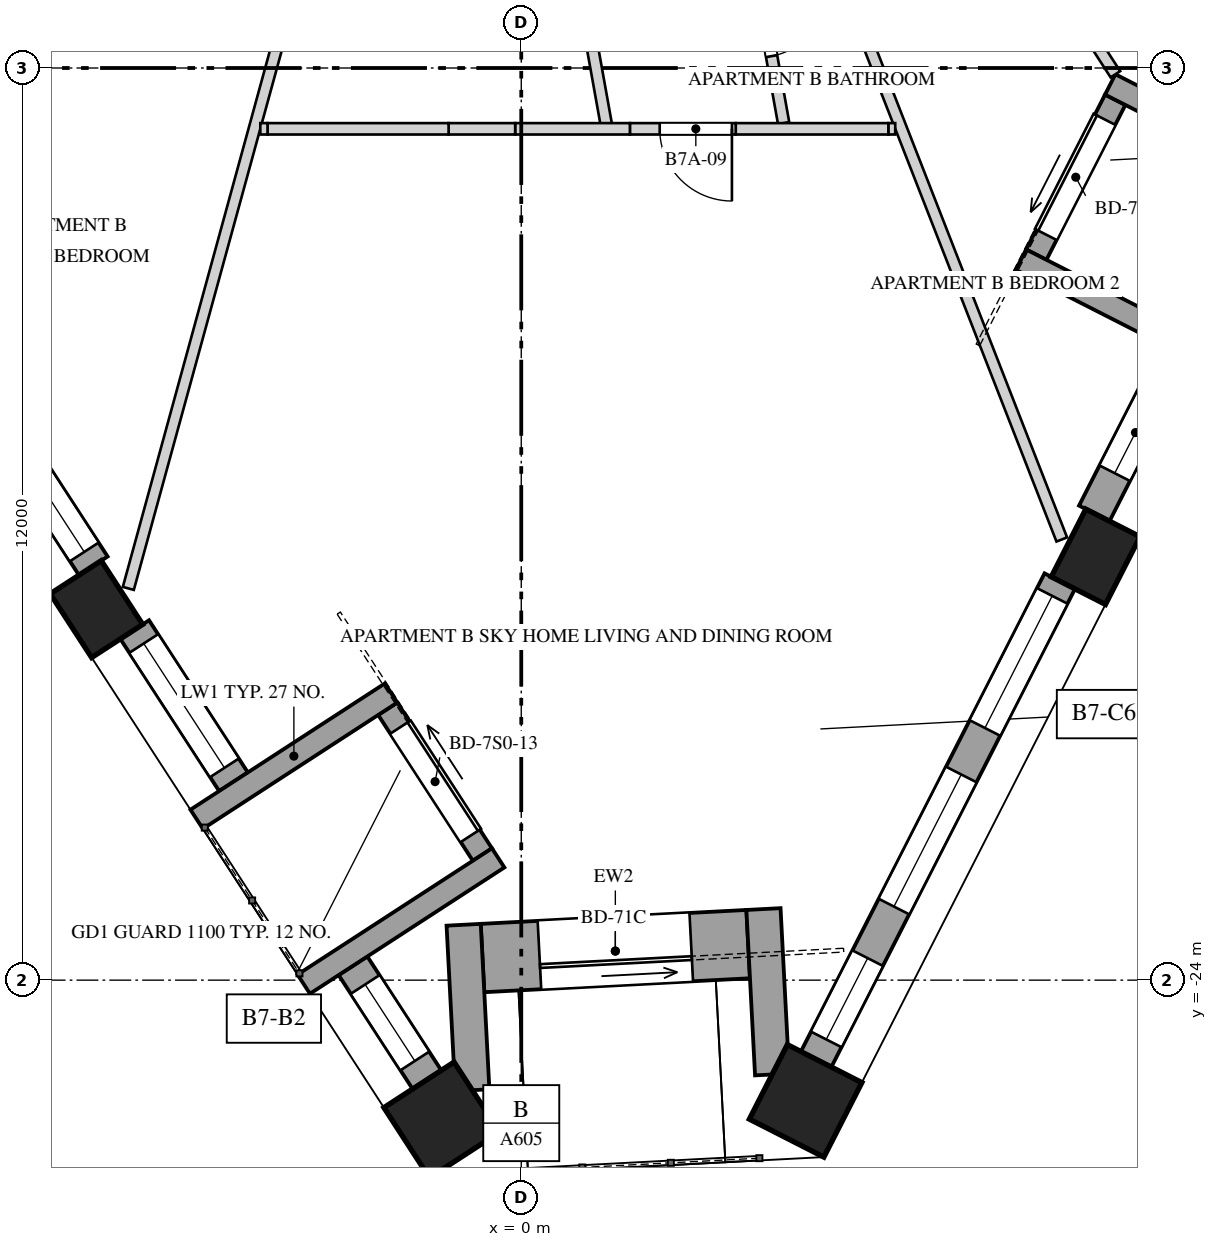
"""IFC4 building model, lengths in metres.
Left out: names, types, materials, properties, quantities, classifications, styles, units other than length and angle.
Written with IfcOpenShell. Run it as: python <this file> out.ifc"""

import sys

from ifc_helpers import new_model, si_unit, direction, frame, frame_2d, origin, origin_2d, place, context, subcontext, project, spatial, polyline, rectangle, outline, extrude, element, fill, save


model = new_model("IFC4")
c1 = context("Model", 3, precision=1e-05, world=origin(), true_north=direction((0.0, 1.0)))
c2 = subcontext(c1, "Body", "Model", "MODEL_VIEW")
j1 = project(units=[si_unit("LENGTHUNIT", "METRE"), si_unit("PLANEANGLEUNIT", "RADIAN")], contexts=[c1])
p1 = place(None, origin())
s1 = spatial("IfcSite", under=j1, at=p1, CompositionType="ELEMENT")
p2 = place(p1, origin())
s2 = spatial("IfcBuilding", under=s1, at=p2, CompositionType="ELEMENT")
p3 = place(p2, frame((0.0, 0.0, 274.4)))
s3 = spatial("IfcBuildingStorey", under=s2, at=p3, CompositionType="ELEMENT", Elevation=274.4)
p4 = place(p3, frame((-5.589, -19.119, -0.35), z_axis=(0.0, 0.0, 1.0), x_axis=(0.544639035015, -0.838670567945, 0.0)))
e1 = element("IfcColumn", 1, at=p4, inside=s3, PredefinedType="COLUMN", context=c2, shape_type="SweptSolid", body=[
    extrude(rectangle(XDim=1.0, YDim=0.8, at=origin_2d()), origin(), (0.0, 0.0, 1.0), 4.35),
])
for number, where, z_axis, x_axis in (
    (2, (-1.046, -25.839, -0.35), (0.0, 0.0, 1.0), (0.545, -0.839, 0.0)),
    (3, (3.741, -25.588, -0.35), (0.0, 0.0, 1.0), (0.454, 0.891, 0.0)),
):
    element("IfcColumn", number, at=place(p3, frame(where, z_axis=z_axis, x_axis=x_axis)), inside=s3, PredefinedType="COLUMN", context=c2, shape_type="SweptSolid", body=[
        extrude(rectangle(XDim=1.1, YDim=1.1, at=origin_2d()), origin(), (0.0, 0.0, 1.0), 4.35),
    ])
p5 = place(p3, frame((7.557, -18.43, -0.35), z_axis=(0.0, 0.0, 1.0), x_axis=(0.45399049974, 0.891006524188, 0.0)))
e4 = element("IfcColumn", 4, at=p5, inside=s3, PredefinedType="COLUMN", context=c2, shape_type="SweptSolid", body=[
    extrude(rectangle(XDim=1.0, YDim=0.8, at=origin_2d()), origin(), (0.0, 0.0, 1.0), 4.35),
])
p6 = place(p3, frame((-9.803, -12.125, 0.0), z_axis=(0.0, 0.0, 1.0), x_axis=(0.544649987904, -0.838663454954, 0.0)))
e5 = element("IfcWall", 5, at=p6, inside=s3, PredefinedType="SOLIDWALL", context=c2, shape_type="SweptSolid", body=[
    extrude(rectangle(XDim=7.66, YDim=0.45, at=frame_2d((3.83, 0.0))), origin(), (0.0, 0.0, 1.0), 3.3),
])
p7 = place(p6, frame((0.218, 0.0, 0.4)))
e6 = element("IfcOpeningElement", 6, at=p7, cuts=e5, PredefinedType="OPENING", context=c2, shape_type="SweptSolid", body=[
    extrude(rectangle(XDim=1.95, YDim=2.75, at=frame_2d((0.975, 1.375))), frame((0.0, 0.235, 0.0), z_axis=(0.0, -1.0, 0.0), x_axis=(1.0, 0.0, 0.0)), (0.0, 0.0, 1.0), 0.47),
])
p8 = place(p6, frame((2.855, 0.0, 0.4)))
e7 = element("IfcOpeningElement", 7, at=p8, cuts=e5, PredefinedType="OPENING", context=c2, shape_type="SweptSolid", body=[
    extrude(rectangle(XDim=1.95, YDim=2.75, at=frame_2d((0.975, 1.375))), frame((0.0, 0.235, 0.0), z_axis=(0.0, -1.0, 0.0), x_axis=(1.0, 0.0, 0.0)), (0.0, 0.0, 1.0), 0.47),
])
p9 = place(p6, frame((5.492, 0.0, 0.4)))
e8 = element("IfcOpeningElement", 8, at=p9, cuts=e5, PredefinedType="OPENING", context=c2, shape_type="SweptSolid", body=[
    extrude(rectangle(XDim=1.95, YDim=2.1, at=frame_2d((0.975, 1.05))), frame((0.0, 0.235, 0.0), z_axis=(0.0, -1.0, 0.0), x_axis=(1.0, 0.0, 0.0)), (0.0, 0.0, 1.0), 0.47),
])
p10 = place(p3, frame((-5.086, -19.388, 0.0), z_axis=(0.0, 0.0, 1.0), x_axis=(0.544675520966, -0.838646872563, 0.0)))
e9 = element("IfcWall", 9, at=p10, inside=s3, PredefinedType="SOLIDWALL", context=c2, shape_type="SweptSolid", body=[
    extrude(rectangle(XDim=2.387, YDim=0.45, at=frame_2d((1.193, 0.0))), origin(), (0.0, 0.0, 1.0), 3.3),
])
p11 = place(p10, frame((0.218, 0.0, 0.4)))
e10 = element("IfcOpeningElement", 10, at=p11, cuts=e9, PredefinedType="OPENING", context=c2, shape_type="SweptSolid", body=[
    extrude(rectangle(XDim=1.95, YDim=2.75, at=frame_2d((0.975, 1.375))), frame((0.0, 0.235, 0.0), z_axis=(0.0, -1.0, 0.0), x_axis=(1.0, 0.0, 0.0)), (0.0, 0.0, 1.0), 0.47),
])
p12 = place(p3, frame((-2.214, -23.811, 0.0), z_axis=(0.0, 0.0, 1.0), x_axis=(0.544632902776, -0.838674550236, 0.0)))
e11 = element("IfcWall", 11, at=p12, inside=s3, PredefinedType="SOLIDWALL", context=c2, shape_type="SweptSolid", body=[
    extrude(rectangle(XDim=1.787, YDim=0.45, at=frame_2d((0.894, 0.0))), origin(), (0.0, 0.0, 1.0), 3.3),
])
p13 = place(p12, frame((0.293, 0.0, 0.4)))
e12 = element("IfcOpeningElement", 12, at=p13, cuts=e11, PredefinedType="OPENING", context=c2, shape_type="SweptSolid", body=[
    extrude(rectangle(XDim=1.2, YDim=2.1, at=frame_2d((0.6, 1.05))), frame((0.0, 0.235, 0.0), z_axis=(0.0, -1.0, 0.0), x_axis=(1.0, 0.0, 0.0)), (0.0, 0.0, 1.0), 0.47),
])
p14 = place(p3, frame((3.879, -25.041, 0.0), z_axis=(0.0, 0.0, 1.0), x_axis=(0.453992084912, 0.891005716501, 0.0)))
e13 = element("IfcWall", 13, at=p14, inside=s3, PredefinedType="SOLIDWALL", context=c2, shape_type="SweptSolid", body=[
    extrude(rectangle(XDim=7.06, YDim=0.45, at=frame_2d((3.53, 0.0))), origin(), (0.0, 0.0, 1.0), 3.3),
])
p15 = place(p14, frame((0.293, 0.0, 0.4)))
e14 = element("IfcOpeningElement", 14, at=p15, cuts=e13, PredefinedType="OPENING", context=c2, shape_type="SweptSolid", body=[
    extrude(rectangle(XDim=1.2, YDim=2.1, at=frame_2d((0.6, 1.05))), frame((0.0, 0.235, 0.0), z_axis=(0.0, -1.0, 0.0), x_axis=(1.0, 0.0, 0.0)), (0.0, 0.0, 1.0), 0.47),
])
p16 = place(p14, frame((2.255, 0.0, 0.4)))
e15 = element("IfcOpeningElement", 15, at=p16, cuts=e13, PredefinedType="OPENING", context=c2, shape_type="SweptSolid", body=[
    extrude(rectangle(XDim=1.95, YDim=2.75, at=frame_2d((0.975, 1.375))), frame((0.0, 0.235, 0.0), z_axis=(0.0, -1.0, 0.0), x_axis=(1.0, 0.0, 0.0)), (0.0, 0.0, 1.0), 0.47),
])
p17 = place(p14, frame((4.892, 0.0, 0.4)))
e16 = element("IfcOpeningElement", 16, at=p17, cuts=e13, PredefinedType="OPENING", context=c2, shape_type="SweptSolid", body=[
    extrude(rectangle(XDim=1.95, YDim=2.75, at=frame_2d((0.975, 1.375))), frame((0.0, 0.235, 0.0), z_axis=(0.0, -1.0, 0.0), x_axis=(1.0, 0.0, 0.0)), (0.0, 0.0, 1.0), 0.47),
])
p18 = place(p3, frame((7.539, -17.859, 0.0), z_axis=(0.0, 0.0, 1.0), x_axis=(0.454074413722, 0.890963762901, 0.0)))
e17 = element("IfcWall", 17, at=p18, inside=s3, PredefinedType="SOLIDWALL", context=c2, shape_type="SweptSolid", body=[
    extrude(rectangle(XDim=2.387, YDim=0.45, at=frame_2d((1.193, 0.0))), origin(), (0.0, 0.0, 1.0), 3.3),
])
p19 = place(p18, frame((0.593, 0.0, 0.4)))
e18 = element("IfcOpeningElement", 18, at=p19, cuts=e17, PredefinedType="OPENING", context=c2, shape_type="SweptSolid", body=[
    extrude(rectangle(XDim=1.2, YDim=2.75, at=frame_2d((0.6, 1.375))), frame((0.0, 0.235, 0.0), z_axis=(0.0, -1.0, 0.0), x_axis=(1.0, 0.0, 0.0)), (0.0, 0.0, 1.0), 0.47),
])
p20 = place(p3, frame((-1.757, -20.43, 0.0), z_axis=(0.0, 0.0, 1.0), x_axis=(0.544658103125, -0.838658184662, 0.0)))
e19 = element("IfcWall", 19, at=p20, inside=s3, PredefinedType="SOLIDWALL", context=c2, shape_type="SweptSolid", body=[
    extrude(rectangle(XDim=2.287, YDim=0.3, at=frame_2d((1.144, 0.0))), origin(), (0.0, 0.0, 1.0), 3.3),
])
p21 = place(p20, frame((0.293, 0.0, 0.0)))
e20 = element("IfcOpeningElement", 20, at=p21, cuts=e19, PredefinedType="OPENING", context=c2, shape_type="SweptSolid", body=[
    extrude(rectangle(XDim=1.7, YDim=2.5, at=frame_2d((0.85, 1.25))), frame((0.0, 0.16, 0.0), z_axis=(0.0, -1.0, 0.0), x_axis=(1.0, 0.0, 0.0)), (0.0, 0.0, 1.0), 0.32),
])
p22 = place(p3, frame((-4.271, -21.883, 0.0), z_axis=(0.0, 0.0, 1.0), x_axis=(0.838688583525, 0.544611292451, 0.0)))
e21 = element("IfcWall", 21, at=p22, inside=s3, PredefinedType="SOLIDWALL", context=c2, shape_type="SweptSolid", body=[
    extrude(rectangle(XDim=3.05, YDim=0.3, at=frame_2d((1.525, 0.0))), origin(), (0.0, 0.0, 1.0), 3.3),
])
p23 = place(p3, frame((-2.862, -24.053, 0.0), z_axis=(0.0, 0.0, 1.0), x_axis=(0.838664840319, 0.544647854685, 0.0)))
e22 = element("IfcWall", 22, at=p23, inside=s3, PredefinedType="SOLIDWALL", context=c2, shape_type="SweptSolid", body=[
    extrude(rectangle(XDim=3.05, YDim=0.3, at=frame_2d((1.525, 0.0))), origin(), (0.0, 0.0, 1.0), 3.3),
])
p24 = place(p3, frame((6.776, -14.455, 0.0), z_axis=(0.0, 0.0, 1.0), x_axis=(0.454076116559, 0.890962895058, 0.0)))
e23 = element("IfcWall", 23, at=p24, inside=s3, PredefinedType="SOLIDWALL", context=c2, shape_type="SweptSolid", body=[
    extrude(rectangle(XDim=2.287, YDim=0.3, at=frame_2d((1.143, 0.0))), origin(), (0.0, 0.0, 1.0), 3.3),
])
p25 = place(p24, frame((0.293, 0.0, 0.0)))
e24 = element("IfcOpeningElement", 24, at=p25, cuts=e23, PredefinedType="OPENING", context=c2, shape_type="SweptSolid", body=[
    extrude(rectangle(XDim=1.7, YDim=2.5, at=frame_2d((0.85, 1.25))), frame((0.0, 0.16, 0.0), z_axis=(0.0, -1.0, 0.0), x_axis=(1.0, 0.0, 0.0)), (0.0, 0.0, 1.0), 0.32),
])
p26 = place(p3, frame((9.292, -15.906, 0.0), z_axis=(0.0, 0.0, 1.0), x_axis=(-0.891023613249, 0.453956959009, 0.0)))
e25 = element("IfcWall", 25, at=p26, inside=s3, PredefinedType="SOLIDWALL", context=c2, shape_type="SweptSolid", body=[
    extrude(rectangle(XDim=3.05, YDim=0.3, at=frame_2d((1.525, 0.0))), origin(), (0.0, 0.0, 1.0), 3.3),
])
p27 = place(p3, frame((10.466, -13.601, 0.0), z_axis=(0.0, 0.0, 1.0), x_axis=(-0.890991233495, 0.454020508165, 0.0)))
e26 = element("IfcWall", 26, at=p27, inside=s3, PredefinedType="SOLIDWALL", context=c2, shape_type="SweptSolid", body=[
    extrude(rectangle(XDim=3.05, YDim=0.3, at=frame_2d((1.525, 0.0))), origin(), (0.0, 0.0, 1.0), 3.3),
])
p28 = place(p3, frame((2.985, -23.526, 0.0), z_axis=(0.0, 0.0, 1.0), x_axis=(-0.998626871225, -0.0523867547, 0.0)))
e27 = element("IfcWall", 27, at=p28, inside=s3, PredefinedType="SOLIDWALL", context=c2, shape_type="SweptSolid", body=[
    extrude(rectangle(XDim=3.5, YDim=0.9, at=frame_2d((1.75, 0.0))), origin(), (0.0, 0.0, 1.0), 3.3),
])
p29 = place(p28, frame((0.75, 0.0, 0.0)))
e28 = element("IfcOpeningElement", 28, at=p29, cuts=e27, PredefinedType="OPENING", context=c2, shape_type="SweptSolid", body=[
    extrude(rectangle(XDim=2.0, YDim=2.4, at=frame_2d((1.0, 1.2))), frame((0.0, 0.46, 0.0), z_axis=(0.0, -1.0, 0.0), x_axis=(1.0, 0.0, 0.0)), (0.0, 0.0, 1.0), 0.92),
])
p30 = place(p3, frame((3.301, -25.241, 0.0), z_axis=(0.0, 0.0, 1.0), x_axis=(-0.052323605405, 0.998630181958, 0.0)))
e29 = element("IfcWall", 29, at=p30, inside=s3, PredefinedType="SOLIDWALL", context=c2, shape_type="SweptSolid", body=[
    extrude(rectangle(XDim=2.179, YDim=0.45, at=frame_2d((1.089, 0.0))), origin(), (0.0, 0.0, 1.0), 2.55),
])
p31 = place(p3, frame((-0.644, -25.448, 0.0), z_axis=(0.0, 0.0, 1.0), x_axis=(-0.052317751649, 0.998630488651, 0.0)))
e30 = element("IfcWall", 30, at=p31, inside=s3, PredefinedType="SOLIDWALL", context=c2, shape_type="SweptSolid", body=[
    extrude(rectangle(XDim=2.179, YDim=0.45, at=frame_2d((1.09, 0.0))), origin(), (0.0, 0.0, 1.0), 2.55),
])
p32 = place(p3, frame((-8.314, -14.004, 0.0), z_axis=(0.0, 0.0, 1.0), x_axis=(0.510490601778, 0.859883332491, 0.0)))
e31 = element("IfcWall", 31, at=p32, inside=s3, PredefinedType="PARTITIONING", context=c2, shape_type="SweptSolid", body=[
    extrude(rectangle(XDim=4.686, YDim=0.15, at=frame_2d((2.343, 0.0))), origin(), (0.0, 0.0, 1.0), 3.65),
])
p33 = place(p3, frame((-5.169, -18.846, 0.0), z_axis=(0.0, 0.0, 1.0), x_axis=(0.264522923164, 0.964379397914, 0.0)))
e32 = element("IfcWall", 32, at=p33, inside=s3, PredefinedType="PARTITIONING", context=c2, shape_type="SweptSolid", body=[
    extrude(rectangle(XDim=9.199, YDim=0.15, at=frame_2d((4.6, 0.0))), origin(), (0.0, 0.0, 1.0), 2.75),
])
p34 = place(p3, frame((1.128, -12.797, 0.0), z_axis=(0.0, 0.0, 1.0), x_axis=(-0.176626932502, 0.984277870682, 0.0)))
e33 = element("IfcWall", 33, at=p34, inside=s3, PredefinedType="PARTITIONING", context=c2, shape_type="SweptSolid", body=[
    extrude(rectangle(XDim=2.94, YDim=0.15, at=frame_2d((1.47, 0.0))), origin(), (0.0, 0.0, 1.0), 3.65),
])
p35 = place(p3, frame((2.946, -9.905, 0.0), z_axis=(0.0, 0.0, 1.0), x_axis=(0.17664289563, -0.984275005993, 0.0)))
e34 = element("IfcWall", 34, at=p35, inside=s3, PredefinedType="PARTITIONING", context=c2, shape_type="SweptSolid", body=[
    extrude(rectangle(XDim=2.865, YDim=0.15, at=frame_2d((1.433, 0.0))), origin(), (0.0, 0.0, 1.0), 3.65),
])
p36 = place(p35, frame((1.12, 0.0, 0.0)))
e35 = element("IfcOpeningElement", 35, at=p36, cuts=e34, PredefinedType="OPENING", context=c2, shape_type="SweptSolid", body=[
    extrude(rectangle(XDim=0.85, YDim=2.4, at=frame_2d((0.425, 1.2))), frame((0.0, 0.085, 0.0), z_axis=(0.0, -1.0, 0.0), x_axis=(1.0, 0.0, 0.0)), (0.0, 0.0, 1.0), 0.17),
])
p37 = place(p3, frame((3.897, -9.975, 0.0), z_axis=(0.0, 0.0, 1.0), x_axis=(0.363873008582, -0.931448567354, 0.0)))
e36 = element("IfcWall", 36, at=p37, inside=s3, PredefinedType="PARTITIONING", context=c2, shape_type="SweptSolid", body=[
    extrude(rectangle(XDim=8.833, YDim=0.15, at=frame_2d((4.417, 0.0))), origin(), (0.0, 0.0, 1.0), 2.75),
])
p38 = place(p3, frame((4.92, -12.8, 0.0), z_axis=(0.0, 0.0, 1.0), x_axis=(-1.0, 0.0, 0.0)))
e37 = element("IfcWall", 37, at=p38, inside=s3, PredefinedType="PARTITIONING", context=c2, shape_type="SweptSolid", body=[
    extrude(rectangle(XDim=0.09, YDim=0.15, at=frame_2d((0.045, 0.0))), origin(), (0.0, 0.0, 1.0), 2.75),
])
p39 = place(p3, frame((4.83, -12.8, 0.0), z_axis=(0.0, 0.0, 1.0), x_axis=(-1.0, 0.0, 0.0)))
e38 = element("IfcWall", 38, at=p39, inside=s3, PredefinedType="PARTITIONING", context=c2, shape_type="SweptSolid", body=[
    extrude(rectangle(XDim=2.008, YDim=0.15, at=frame_2d((1.004, 0.0))), origin(), (0.0, 0.0, 1.0), 3.65),
])
p40 = place(p3, frame((2.822, -12.8, 0.0), z_axis=(0.0, 0.0, 1.0), x_axis=(-1.0, 0.0, 0.0)))
e39 = element("IfcWall", 39, at=p40, inside=s3, PredefinedType="PARTITIONING", context=c2, shape_type="SweptSolid", body=[
    extrude(outline(polyline([(0.0, 0.0), (1.392, 0.0), (1.392, 2.55), (0.508, 2.55), (0.508, 3.65), (0.0, 3.65), (0.0, 0.0)])), frame((0.0, 0.075, 0.0), z_axis=(0.0, -1.0, 0.0), x_axis=(1.0, 0.0, 0.0)), (0.0, 0.0, 1.0), 0.15),
])
p41 = place(p40, frame((0.05, 0.0, 0.0)))
e40 = element("IfcOpeningElement", 40, at=p41, cuts=e39, PredefinedType="OPENING", context=c2, shape_type="SweptSolid", body=[
    extrude(rectangle(XDim=0.95, YDim=2.4, at=frame_2d((0.475, 1.2))), frame((0.0, 0.085, 0.0), z_axis=(0.0, -1.0, 0.0), x_axis=(1.0, 0.0, 0.0)), (0.0, 0.0, 1.0), 0.17),
])
p42 = place(p3, frame((1.429, -12.8, 0.0), z_axis=(0.0, 0.0, 1.0), x_axis=(-1.0, 0.0, 0.0)))
e41 = element("IfcWall", 41, at=p42, inside=s3, PredefinedType="PARTITIONING", context=c2, shape_type="SweptSolid", body=[
    extrude(rectangle(XDim=1.51, YDim=0.15, at=frame_2d((0.755, 0.0))), origin(), (0.0, 0.0, 1.0), 3.65),
])
p43 = place(p3, frame((-0.08, -12.8, 0.0), z_axis=(0.0, 0.0, 1.0), x_axis=(-1.0, 0.0, 0.0)))
e42 = element("IfcWall", 42, at=p43, inside=s3, PredefinedType="PARTITIONING", context=c2, shape_type="SweptSolid", body=[
    extrude(rectangle(XDim=0.876, YDim=0.15, at=frame_2d((0.438, 0.0))), origin(), (0.0, 0.0, 1.0), 2.55),
])
p44 = place(p3, frame((-0.956, -12.8, 0.0), z_axis=(0.0, 0.0, 1.0), x_axis=(-1.0, 0.0, 0.0)))
e43 = element("IfcWall", 43, at=p44, inside=s3, PredefinedType="PARTITIONING", context=c2, shape_type="SweptSolid", body=[
    extrude(rectangle(XDim=2.382, YDim=0.15, at=frame_2d((1.191, 0.0))), origin(), (0.0, 0.0, 1.0), 3.65),
])
p45 = place(p3, frame((-3.338, -12.8, 0.0), z_axis=(0.0, 0.0, 1.0), x_axis=(-1.0, 0.0, 0.0)))
e44 = element("IfcWall", 44, at=p45, inside=s3, PredefinedType="PARTITIONING", context=c2, shape_type="SweptSolid", body=[
    extrude(rectangle(XDim=0.095, YDim=0.15, at=frame_2d((0.047, 0.0))), origin(), (0.0, 0.0, 1.0), 2.75),
])
p46 = place(p3, frame((6.453, -9.975, 0.0), z_axis=(0.0, 0.0, 1.0), x_axis=(0.543154479249, -0.839632783824, 0.0)))
e45 = element("IfcWall", 45, at=p46, inside=s3, PredefinedType="PARTITIONING", context=c2, shape_type="SweptSolid", body=[
    extrude(rectangle(XDim=2.51, YDim=0.15, at=frame_2d((1.255, 0.0))), origin(), (0.0, 0.0, 1.0), 3.65),
])
p47 = place(p9, origin())
e46 = element("IfcWindow", 46, at=p47, inside=s3, PartitioningType="SINGLE_PANEL", PredefinedType="WINDOW", context=c2, shape_type="SweptSolid", body=[
    extrude(rectangle(XDim=1.95, YDim=2.1, at=frame_2d((0.975, 1.05))), frame((0.0, 0.03, 0.0), z_axis=(0.0, -1.0, 0.0), x_axis=(1.0, 0.0, 0.0)), (0.0, 0.0, 1.0), 0.06),
])
fill(e8, e46)
p48 = place(p11, origin())
e47 = element("IfcWindow", 47, at=p48, inside=s3, PartitioningType="SINGLE_PANEL", PredefinedType="WINDOW", context=c2, shape_type="SweptSolid", body=[
    extrude(rectangle(XDim=1.95, YDim=2.75, at=frame_2d((0.975, 1.375))), frame((0.0, 0.03, 0.0), z_axis=(0.0, -1.0, 0.0), x_axis=(1.0, 0.0, 0.0)), (0.0, 0.0, 1.0), 0.06),
])
fill(e10, e47)
p49 = place(p13, origin())
e48 = element("IfcWindow", 48, at=p49, inside=s3, PartitioningType="SINGLE_PANEL", PredefinedType="WINDOW", context=c2, shape_type="SweptSolid", body=[
    extrude(rectangle(XDim=1.2, YDim=2.1, at=frame_2d((0.6, 1.05))), frame((0.0, 0.03, 0.0), z_axis=(0.0, -1.0, 0.0), x_axis=(1.0, 0.0, 0.0)), (0.0, 0.0, 1.0), 0.06),
])
fill(e12, e48)
p50 = place(p15, origin())
e49 = element("IfcWindow", 49, at=p50, inside=s3, PartitioningType="SINGLE_PANEL", PredefinedType="WINDOW", context=c2, shape_type="SweptSolid", body=[
    extrude(rectangle(XDim=1.2, YDim=2.1, at=frame_2d((0.6, 1.05))), frame((0.0, 0.03, 0.0), z_axis=(0.0, -1.0, 0.0), x_axis=(1.0, 0.0, 0.0)), (0.0, 0.0, 1.0), 0.06),
])
fill(e14, e49)
p51 = place(p16, origin())
e50 = element("IfcWindow", 50, at=p51, inside=s3, PartitioningType="SINGLE_PANEL", PredefinedType="WINDOW", context=c2, shape_type="SweptSolid", body=[
    extrude(rectangle(XDim=1.95, YDim=2.75, at=frame_2d((0.975, 1.375))), frame((0.0, 0.03, 0.0), z_axis=(0.0, -1.0, 0.0), x_axis=(1.0, 0.0, 0.0)), (0.0, 0.0, 1.0), 0.06),
])
fill(e15, e50)
p52 = place(p17, origin())
e51 = element("IfcWindow", 51, at=p52, inside=s3, PartitioningType="SINGLE_PANEL", PredefinedType="WINDOW", context=c2, shape_type="SweptSolid", body=[
    extrude(rectangle(XDim=1.95, YDim=2.75, at=frame_2d((0.975, 1.375))), frame((0.0, 0.03, 0.0), z_axis=(0.0, -1.0, 0.0), x_axis=(1.0, 0.0, 0.0)), (0.0, 0.0, 1.0), 0.06),
])
fill(e16, e51)
p53 = place(p19, origin())
e52 = element("IfcWindow", 52, at=p53, inside=s3, PartitioningType="SINGLE_PANEL", PredefinedType="WINDOW", context=c2, shape_type="SweptSolid", body=[
    extrude(rectangle(XDim=1.2, YDim=2.75, at=frame_2d((0.6, 1.375))), frame((0.0, 0.03, 0.0), z_axis=(0.0, -1.0, 0.0), x_axis=(1.0, 0.0, 0.0)), (0.0, 0.0, 1.0), 0.06),
])
fill(e18, e52)
p54 = place(p21, origin())
e53 = element("IfcDoor", 53, at=p54, inside=s3, OperationType="SLIDING_TO_LEFT", PredefinedType="DOOR", context=c2, shape_type="SweptSolid", body=[
    extrude(rectangle(XDim=1.7, YDim=2.5, at=frame_2d((0.85, 1.25))), frame((0.0, 0.025, 0.0), z_axis=(0.0, -1.0, 0.0), x_axis=(1.0, 0.0, 0.0)), (0.0, 0.0, 1.0), 0.05),
])
fill(e20, e53)
p55 = place(p25, origin())
e54 = element("IfcDoor", 54, at=p55, inside=s3, OperationType="SLIDING_TO_LEFT", PredefinedType="DOOR", context=c2, shape_type="SweptSolid", body=[
    extrude(rectangle(XDim=1.7, YDim=2.5, at=frame_2d((0.85, 1.25))), frame((0.0, 0.025, 0.0), z_axis=(0.0, -1.0, 0.0), x_axis=(1.0, 0.0, 0.0)), (0.0, 0.0, 1.0), 0.05),
])
fill(e24, e54)
p56 = place(p29, origin())
e55 = element("IfcDoor", 55, at=p56, inside=s3, OperationType="SLIDING_TO_LEFT", PredefinedType="DOOR", context=c2, shape_type="SweptSolid", body=[
    extrude(rectangle(XDim=2.0, YDim=2.4, at=frame_2d((1.0, 1.2))), frame((0.0, 0.025, 0.0), z_axis=(0.0, -1.0, 0.0), x_axis=(1.0, 0.0, 0.0)), (0.0, 0.0, 1.0), 0.05),
])
fill(e28, e55)
p57 = place(p36, origin())
e56 = element("IfcDoor", 56, at=p57, inside=s3, OperationType="SINGLE_SWING_RIGHT", PredefinedType="DOOR", context=c2, shape_type="SweptSolid", body=[
    extrude(rectangle(XDim=0.85, YDim=2.4, at=frame_2d((0.425, 1.2))), frame((0.0, 0.025, 0.0), z_axis=(0.0, -1.0, 0.0), x_axis=(1.0, 0.0, 0.0)), (0.0, 0.0, 1.0), 0.05),
])
fill(e35, e56)
p58 = place(p41, origin())
e57 = element("IfcDoor", 57, at=p58, inside=s3, OperationType="SINGLE_SWING_LEFT", PredefinedType="DOOR", context=c2, shape_type="SweptSolid", body=[
    extrude(rectangle(XDim=0.95, YDim=2.4, at=frame_2d((0.475, 1.2))), frame((0.0, 0.025, 0.0), z_axis=(0.0, -1.0, 0.0), x_axis=(1.0, 0.0, 0.0)), (0.0, 0.0, 1.0), 0.05),
])
fill(e40, e57)
save(model, sys.argv[1])
